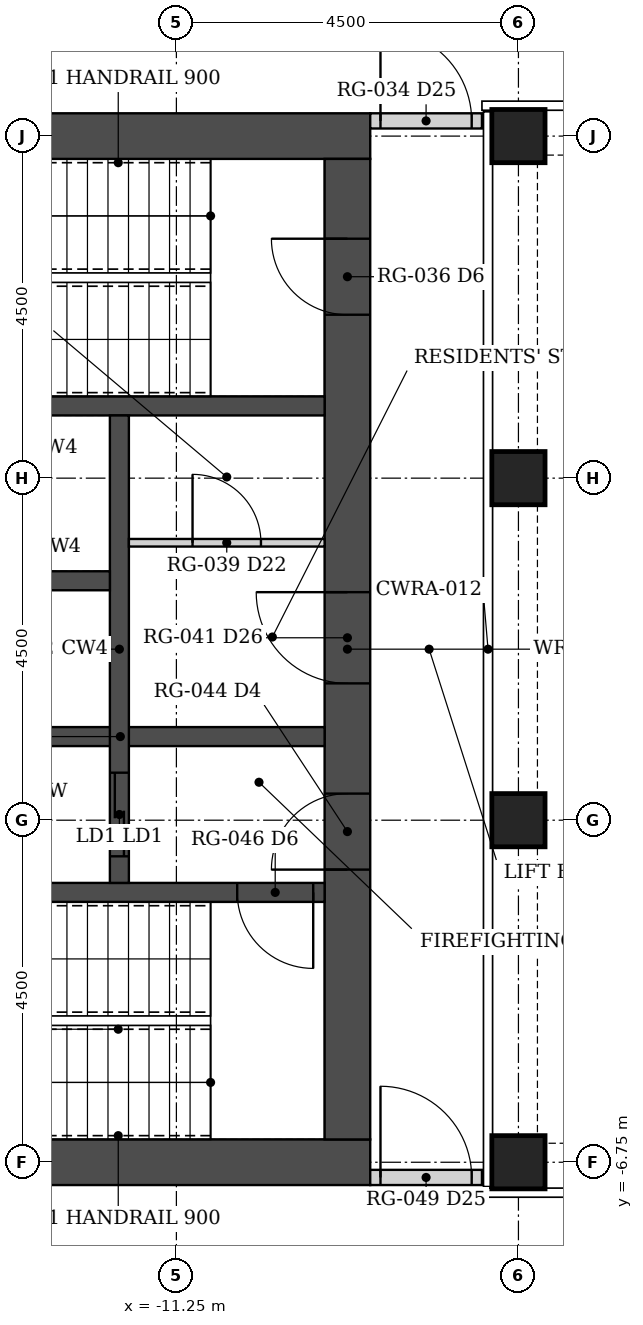
"""IFC4 building model, lengths in metres.
Left out: names, types, materials, properties, quantities, classifications, styles, units other than length and angle.
Written with IfcOpenShell. Run it as: python <this file> out.ifc"""

import sys

from ifc_helpers import new_model, si_unit, direction, frame, frame_2d, origin, origin_2d, place, context, subcontext, project, spatial, rectangle, hollow_rectangle, extrude, element, fill, save


model = new_model("IFC4")
c1 = context("Model", 3, precision=1e-05, world=origin(), true_north=direction((0.0, 1.0)))
c2 = subcontext(c1, "Body", "Model", "MODEL_VIEW")
j1 = project(units=[si_unit("LENGTHUNIT", "METRE"), si_unit("PLANEANGLEUNIT", "RADIAN")], contexts=[c1])
p1 = place(None, origin())
s1 = spatial("IfcSite", under=j1, at=p1, CompositionType="ELEMENT")
p2 = place(p1, origin())
s2 = spatial("IfcBuilding", under=s1, at=p2, CompositionType="ELEMENT")
p3 = place(p2, frame((0.0, 0.0, 89.5)))
s3 = spatial("IfcBuildingStorey", under=s2, at=p3, CompositionType="ELEMENT", Elevation=89.5)
for number, where, z_axis, x_axis in (
    (1, (-6.75, -6.75, 0.0), (0.0, 0.0, 1.0), (1.0, 0.0, 0.0)),
    (2, (-6.75, -2.25, 0.0), (0.0, 0.0, 1.0), (1.0, 0.0, 0.0)),
    (3, (-6.75, 2.25, 0.0), (0.0, 0.0, 1.0), (1.0, 0.0, 0.0)),
    (4, (-6.75, 6.75, 0.0), (0.0, 0.0, 1.0), (1.0, 0.0, 0.0)),
):
    element("IfcColumn", number, at=place(p3, frame(where, z_axis=z_axis, x_axis=x_axis)), inside=s3, PredefinedType="COLUMN", context=c2, shape_type="SweptSolid", body=[
        extrude(hollow_rectangle(XDim=0.7, YDim=0.7, WallThickness=0.05, at=origin_2d()), origin(), (0.0, 0.0, 1.0), 3.5),
    ])
for number, where, z_axis, x_axis in (
    (5, (-8.7, -6.75, 0.0), (0.0, 0.0, 1.0), (-1.0, 0.0, 0.0)),
    (6, (-8.7, 6.75, 0.0), (0.0, 0.0, 1.0), (-1.0, 0.0, 0.0)),
):
    element("IfcWall", number, at=place(p3, frame(where, z_axis=z_axis, x_axis=x_axis)), inside=s3, PredefinedType="SHEAR", context=c2, shape_type="SweptSolid", body=[
        extrude(rectangle(XDim=9.6, YDim=0.6, at=frame_2d((4.8, 0.0))), origin(), (0.0, 0.0, 1.0), 3.5),
    ])
p4 = place(p3, frame((-9.0, -6.45, 0.0), z_axis=(0.0, 0.0, 1.0), x_axis=(0.0, 1.0, 0.0)))
e7 = element("IfcWall", 7, at=p4, inside=s3, PredefinedType="SHEAR", context=c2, shape_type="SweptSolid", body=[
    extrude(rectangle(XDim=12.9, YDim=0.6, at=frame_2d((6.45, 0.0))), origin(), (0.0, 0.0, 1.0), 3.5),
])
p5 = place(p4, frame((3.55, 0.0, 0.0)))
e8 = element("IfcOpeningElement", 8, at=p5, cuts=e7, PredefinedType="OPENING", context=c2, shape_type="SweptSolid", body=[
    extrude(rectangle(XDim=1.0, YDim=2.1, at=frame_2d((0.5, 1.05))), frame((0.0, 0.31, 0.0), z_axis=(0.0, -1.0, 0.0), x_axis=(1.0, 0.0, 0.0)), (0.0, 0.0, 1.0), 0.62),
])
p6 = place(p4, frame((6.0, 0.0, 0.0)))
e9 = element("IfcOpeningElement", 9, at=p6, cuts=e7, PredefinedType="OPENING", context=c2, shape_type="SweptSolid", body=[
    extrude(rectangle(XDim=1.2, YDim=2.1, at=frame_2d((0.6, 1.05))), frame((0.0, 0.31, 0.0), z_axis=(0.0, -1.0, 0.0), x_axis=(1.0, 0.0, 0.0)), (0.0, 0.0, 1.0), 0.62),
])
p7 = place(p4, frame((10.85, 0.0, 0.0)))
e10 = element("IfcOpeningElement", 10, at=p7, cuts=e7, PredefinedType="OPENING", context=c2, shape_type="SweptSolid", body=[
    extrude(rectangle(XDim=1.0, YDim=2.1, at=frame_2d((0.5, 1.05))), frame((0.0, 0.31, 0.0), z_axis=(0.0, -1.0, 0.0), x_axis=(1.0, 0.0, 0.0)), (0.0, 0.0, 1.0), 0.62),
])
p8 = place(p3, frame((-9.3, -3.2, 0.0), z_axis=(0.0, 0.0, 1.0), x_axis=(-1.0, 0.0, 0.0)))
e11 = element("IfcWall", 11, at=p8, inside=s3, PredefinedType="SHEAR", context=c2, shape_type="SweptSolid", body=[
    extrude(rectangle(XDim=8.4, YDim=0.25, at=frame_2d((4.2, 0.0))), origin(), (0.0, 0.0, 1.0), 3.5),
])
p9 = place(p8, frame((0.15, 0.0, 0.0)))
e12 = element("IfcOpeningElement", 12, at=p9, cuts=e11, PredefinedType="OPENING", context=c2, shape_type="SweptSolid", body=[
    extrude(rectangle(XDim=1.0, YDim=2.1, at=frame_2d((0.5, 1.05))), frame((0.0, 0.135, 0.0), z_axis=(0.0, -1.0, 0.0), x_axis=(1.0, 0.0, 0.0)), (0.0, 0.0, 1.0), 0.27),
])
p10 = place(p3, frame((-9.3, 3.2, 0.0), z_axis=(0.0, 0.0, 1.0), x_axis=(-1.0, 0.0, 0.0)))
e13 = element("IfcWall", 13, at=p10, inside=s3, PredefinedType="SHEAR", context=c2, shape_type="SweptSolid", body=[
    extrude(rectangle(XDim=8.4, YDim=0.25, at=frame_2d((4.2, 0.0))), origin(), (0.0, 0.0, 1.0), 3.5),
])
p11 = place(p3, frame((-9.3, -1.15, 0.0), z_axis=(0.0, 0.0, 1.0), x_axis=(-1.0, 0.0, 0.0)))
e14 = element("IfcWall", 14, at=p11, inside=s3, PredefinedType="SHEAR", context=c2, shape_type="SweptSolid", body=[
    extrude(rectangle(XDim=5.375, YDim=0.25, at=frame_2d((2.688, 0.0))), origin(), (0.0, 0.0, 1.0), 3.5),
])
p12 = place(p3, frame((-12.0, -3.075, 0.0), z_axis=(0.0, 0.0, 1.0), x_axis=(0.0, 1.0, 0.0)))
e15 = element("IfcWall", 15, at=p12, inside=s3, PredefinedType="SHEAR", context=c2, shape_type="SweptSolid", body=[
    extrude(rectangle(XDim=6.15, YDim=0.25, at=frame_2d((3.075, 0.0))), origin(), (0.0, 0.0, 1.0), 3.5),
])
p13 = place(p12, frame((0.35, 0.0, 0.0)))
e16 = element("IfcOpeningElement", 16, at=p13, cuts=e15, PredefinedType="OPENING", context=c2, shape_type="SweptSolid", body=[
    extrude(rectangle(XDim=1.1, YDim=2.1, at=frame_2d((0.55, 1.05))), frame((0.0, 0.135, 0.0), z_axis=(0.0, -1.0, 0.0), x_axis=(1.0, 0.0, 0.0)), (0.0, 0.0, 1.0), 0.27),
])
p14 = place(p3, frame((-12.125, 0.9, 0.0), z_axis=(0.0, 0.0, 1.0), x_axis=(-1.0, 0.0, 0.0)))
e17 = element("IfcWall", 17, at=p14, inside=s3, PredefinedType="SHEAR", context=c2, shape_type="SweptSolid", body=[
    extrude(rectangle(XDim=2.55, YDim=0.25, at=frame_2d((1.275, 0.0))), origin(), (0.0, 0.0, 1.0), 3.5),
])
p15 = place(p3, frame((-8.7, 6.95, 0.0), z_axis=(0.0, 0.0, 1.0), x_axis=(1.0, 0.0, 0.0)))
e18 = element("IfcWall", 18, at=p15, inside=s3, PredefinedType="PARTITIONING", context=c2, shape_type="SweptSolid", body=[
    extrude(rectangle(XDim=1.47, YDim=0.2, at=frame_2d((0.735, 0.0))), origin(), (0.0, 0.0, 1.0), 2.373),
])
p16 = place(p15, frame((0.135, 0.0, 0.0)))
e19 = element("IfcOpeningElement", 19, at=p16, cuts=e18, PredefinedType="OPENING", context=c2, shape_type="SweptSolid", body=[
    extrude(rectangle(XDim=1.2, YDim=2.1, at=frame_2d((0.6, 1.05))), frame((0.0, 0.11, 0.0), z_axis=(0.0, -1.0, 0.0), x_axis=(1.0, 0.0, 0.0)), (0.0, 0.0, 1.0), 0.22),
])
p17 = place(p3, frame((-8.7, -6.95, 0.0), z_axis=(0.0, 0.0, 1.0), x_axis=(1.0, 0.0, 0.0)))
e20 = element("IfcWall", 20, at=p17, inside=s3, PredefinedType="PARTITIONING", context=c2, shape_type="SweptSolid", body=[
    extrude(rectangle(XDim=1.47, YDim=0.2, at=frame_2d((0.735, 0.0))), origin(), (0.0, 0.0, 1.0), 2.373),
])
p18 = place(p17, frame((0.135, 0.0, 0.0)))
e21 = element("IfcOpeningElement", 21, at=p18, cuts=e20, PredefinedType="OPENING", context=c2, shape_type="SweptSolid", body=[
    extrude(rectangle(XDim=1.2, YDim=2.1, at=frame_2d((0.6, 1.05))), frame((0.0, 0.11, 0.0), z_axis=(0.0, -1.0, 0.0), x_axis=(1.0, 0.0, 0.0)), (0.0, 0.0, 1.0), 0.22),
])
p19 = place(p3, frame((-11.875, 1.4, 0.0), z_axis=(0.0, 0.0, 1.0), x_axis=(1.0, 0.0, 0.0)))
e22 = element("IfcWall", 22, at=p19, inside=s3, PredefinedType="PARTITIONING", context=c2, shape_type="SweptSolid", body=[
    extrude(rectangle(XDim=2.575, YDim=0.1, at=frame_2d((1.288, 0.0))), origin(), (0.0, 0.0, 1.0), 2.373),
])
p20 = place(p19, frame((0.837, 0.0, 0.0)))
e23 = element("IfcOpeningElement", 23, at=p20, cuts=e22, PredefinedType="OPENING", context=c2, shape_type="SweptSolid", body=[
    extrude(rectangle(XDim=0.9, YDim=2.1, at=frame_2d((0.45, 1.05))), frame((0.0, 0.06, 0.0), z_axis=(0.0, -1.0, 0.0), x_axis=(1.0, 0.0, 0.0)), (0.0, 0.0, 1.0), 0.12),
])
p21 = place(p16, origin())
e24 = element("IfcDoor", 24, at=p21, inside=s3, OperationType="DOUBLE_DOOR_DOUBLE_SWING", PredefinedType="DOOR", context=c2, shape_type="SweptSolid", body=[
    extrude(rectangle(XDim=1.2, YDim=2.1, at=frame_2d((0.6, 1.05))), frame((0.0, 0.025, 0.0), z_axis=(0.0, -1.0, 0.0), x_axis=(1.0, 0.0, 0.0)), (0.0, 0.0, 1.0), 0.05),
])
fill(e19, e24)
p22 = place(p18, origin())
e25 = element("IfcDoor", 25, at=p22, inside=s3, OperationType="DOUBLE_DOOR_DOUBLE_SWING", PredefinedType="DOOR", context=c2, shape_type="SweptSolid", body=[
    extrude(rectangle(XDim=1.2, YDim=2.1, at=frame_2d((0.6, 1.05))), frame((0.0, 0.025, 0.0), z_axis=(0.0, -1.0, 0.0), x_axis=(1.0, 0.0, 0.0)), (0.0, 0.0, 1.0), 0.05),
])
fill(e21, e25)
p23 = place(p5, origin())
e26 = element("IfcDoor", 26, at=p23, inside=s3, OperationType="SINGLE_SWING_LEFT", PredefinedType="DOOR", context=c2, shape_type="SweptSolid", body=[
    extrude(rectangle(XDim=1.0, YDim=2.1, at=frame_2d((0.5, 1.05))), frame((0.0, 0.025, 0.0), z_axis=(0.0, -1.0, 0.0), x_axis=(1.0, 0.0, 0.0)), (0.0, 0.0, 1.0), 0.05),
])
fill(e8, e26)
p24 = place(p9, origin())
e27 = element("IfcDoor", 27, at=p24, inside=s3, OperationType="SINGLE_SWING_LEFT", PredefinedType="DOOR", context=c2, shape_type="SweptSolid", body=[
    extrude(rectangle(XDim=1.0, YDim=2.1, at=frame_2d((0.5, 1.05))), frame((0.0, 0.025, 0.0), z_axis=(0.0, -1.0, 0.0), x_axis=(1.0, 0.0, 0.0)), (0.0, 0.0, 1.0), 0.05),
])
fill(e12, e27)
p25 = place(p6, origin())
e28 = element("IfcDoor", 28, at=p25, inside=s3, OperationType="SINGLE_SWING_RIGHT", PredefinedType="DOOR", context=c2, shape_type="SweptSolid", body=[
    extrude(rectangle(XDim=1.2, YDim=2.1, at=frame_2d((0.6, 1.05))), frame((0.0, 0.025, 0.0), z_axis=(0.0, -1.0, 0.0), x_axis=(1.0, 0.0, 0.0)), (0.0, 0.0, 1.0), 0.05),
])
fill(e9, e28)
p26 = place(p20, origin())
e29 = element("IfcDoor", 29, at=p26, inside=s3, OperationType="SINGLE_SWING_LEFT", PredefinedType="DOOR", context=c2, shape_type="SweptSolid", body=[
    extrude(rectangle(XDim=0.9, YDim=2.1, at=frame_2d((0.45, 1.05))), frame((0.0, 0.025, 0.0), z_axis=(0.0, -1.0, 0.0), x_axis=(1.0, 0.0, 0.0)), (0.0, 0.0, 1.0), 0.05),
])
fill(e23, e29)
p27 = place(p7, origin())
e30 = element("IfcDoor", 30, at=p27, inside=s3, OperationType="SINGLE_SWING_RIGHT", PredefinedType="DOOR", context=c2, shape_type="SweptSolid", body=[
    extrude(rectangle(XDim=1.0, YDim=2.1, at=frame_2d((0.5, 1.05))), frame((0.0, 0.025, 0.0), z_axis=(0.0, -1.0, 0.0), x_axis=(1.0, 0.0, 0.0)), (0.0, 0.0, 1.0), 0.05),
])
fill(e10, e30)
p28 = place(p13, origin())
e31 = element("IfcDoor", 31, at=p28, inside=s3, OperationType="DOUBLE_DOOR_SLIDING", PredefinedType="DOOR", context=c2, shape_type="SweptSolid", body=[
    extrude(rectangle(XDim=1.1, YDim=2.1, at=frame_2d((0.55, 1.05))), frame((0.0, 0.025, 0.0), z_axis=(0.0, -1.0, 0.0), x_axis=(1.0, 0.0, 0.0)), (0.0, 0.0, 1.0), 0.05),
])
fill(e16, e31)
save(model, sys.argv[1])
